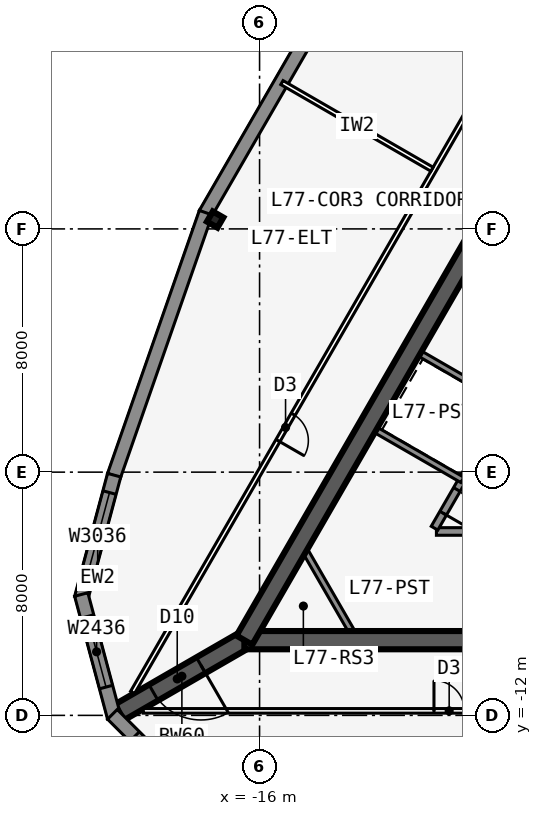
"""IFC4 building model, lengths in metres.
Left out: names, types, materials, properties, quantities, classifications, styles, units other than length and angle.
Written with IfcOpenShell. Run it as: python <this file> out.ifc"""

import sys

from ifc_helpers import new_model, si_unit, direction, frame, frame_2d, origin, origin_2d, place, context, subcontext, project, spatial, polyline, rectangle, i_section, outline, extrude, element, fill, save


model = new_model("IFC4")
c1 = context("Model", 3, precision=1e-05, world=origin(), true_north=direction((0.0, 1.0)))
c2 = subcontext(c1, "Body", "Model", "MODEL_VIEW")
j1 = project(units=[si_unit("LENGTHUNIT", "METRE"), si_unit("PLANEANGLEUNIT", "RADIAN")], contexts=[c1])
p1 = place(None, origin())
s1 = spatial("IfcSite", under=j1, at=p1, CompositionType="ELEMENT")
p2 = place(p1, origin())
s2 = spatial("IfcBuilding", under=s1, at=p2, CompositionType="ELEMENT")
p3 = place(p2, frame((0.0, 0.0, 297.8)))
s3 = spatial("IfcBuildingStorey", under=s2, at=p3, CompositionType="ELEMENT", Elevation=297.8)
p4 = place(p3, frame((-16.5, -9.526, 0.0), z_axis=(0.0, 0.0, 1.0), x_axis=(1.0, 0.0, 0.0)))
e1 = element("IfcWall", 1, at=p4, inside=s3, PredefinedType="SHEAR", context=c2, shape_type="SweptSolid", body=[
    extrude(rectangle(XDim=33.0, YDim=0.6, at=frame_2d((16.5, 0.0))), origin(), (0.0, 0.0, 1.0), 6.0),
])
p5 = place(p4, frame((14.05, 0.0, 0.0)))
e2 = element("IfcOpeningElement", 2, at=p5, cuts=e1, PredefinedType="OPENING", context=c2, shape_type="SweptSolid", body=[
    extrude(rectangle(XDim=1.8, YDim=2.13, at=frame_2d((0.9, 1.065))), frame((0.0, 0.31, 0.0), z_axis=(0.0, -1.0, 0.0), x_axis=(1.0, 0.0, 0.0)), (0.0, 0.0, 1.0), 0.62),
])
p6 = place(p3, frame((-10.183, -5.951, 0.0), z_axis=(0.0, 0.0, 1.0), x_axis=(1.0, 0.0, 0.0)))
e3 = element("IfcWall", 3, at=p6, inside=s3, PredefinedType="SOLIDWALL", context=c2, shape_type="SweptSolid", body=[
    extrude(rectangle(XDim=7.633, YDim=0.25, at=frame_2d((3.816, 0.0))), origin(), (0.0, 0.0, 1.0), 5.75),
])
p7 = place(p3, frame((0.0, 19.052, 0.0), z_axis=(0.0, 0.0, 1.0), x_axis=(-0.499999749417, -0.866025548458, 0.0)))
e4 = element("IfcWall", 4, at=p7, inside=s3, PredefinedType="SHEAR", context=c2, shape_type="SweptSolid", body=[
    extrude(rectangle(XDim=33.0, YDim=0.6, at=frame_2d((16.5, 0.0))), origin(), (0.0, 0.0, 1.0), 6.0),
])
p8 = place(p7, frame((14.15, 0.0, 0.0)))
e5 = element("IfcOpeningElement", 5, at=p8, cuts=e4, PredefinedType="OPENING", context=c2, shape_type="SweptSolid", body=[
    extrude(rectangle(XDim=1.8, YDim=2.13, at=frame_2d((0.9, 1.065))), frame((0.0, 0.31, 0.0), z_axis=(0.0, -1.0, 0.0), x_axis=(1.0, 0.0, 0.0)), (0.0, 0.0, 1.0), 0.62),
])
p9 = place(p7, frame((12.6, 0.0, 0.0)))
e6 = element("IfcOpeningElement", 6, at=p9, cuts=e4, PredefinedType="OPENING", context=c2, shape_type="SweptSolid", body=[
    extrude(rectangle(XDim=1.0, YDim=2.13, at=frame_2d((0.5, 1.065))), frame((0.0, 0.31, 0.0), z_axis=(0.0, -1.0, 0.0), x_axis=(1.0, 0.0, 0.0)), (0.0, 0.0, 1.0), 0.62),
])
p10 = place(p3, frame((-4.929, 3.365, 0.0), z_axis=(0.0, 0.0, 1.0), x_axis=(-0.499991433582, -0.866030349552, 0.0)))
e7 = element("IfcWall", 7, at=p10, inside=s3, PredefinedType="SOLIDWALL", context=c2, shape_type="SweptSolid", body=[
    extrude(rectangle(XDim=10.633, YDim=0.25, at=frame_2d((5.316, 0.0))), origin(), (0.0, 0.0, 1.0), 5.75),
])
p11 = place(p10, frame((9.164, 0.0, 0.0)))
e8 = element("IfcOpeningElement", 8, at=p11, cuts=e7, PredefinedType="OPENING", context=c2, shape_type="SweptSolid", body=[
    extrude(rectangle(XDim=0.9, YDim=2.13, at=frame_2d((0.45, 1.065))), frame((0.0, 0.135, 0.0), z_axis=(0.0, -1.0, 0.0), x_axis=(1.0, 0.0, 0.0)), (0.0, 0.0, 1.0), 0.27),
])
p12 = place(p10, frame((1.1, 0.0, 0.0)))
e9 = element("IfcOpeningElement", 9, at=p12, cuts=e7, PredefinedType="OPENING", context=c2, shape_type="SweptSolid", body=[
    extrude(rectangle(XDim=0.9, YDim=2.13, at=frame_2d((0.45, 1.065))), frame((0.0, 0.135, 0.0), z_axis=(0.0, -1.0, 0.0), x_axis=(1.0, 0.0, 0.0)), (0.0, 0.0, 1.0), 0.27),
])
p13 = place(p10, frame((4.0, 0.0, 0.0)))
e10 = element("IfcOpeningElement", 10, at=p13, cuts=e7, PredefinedType="OPENING", context=c2, shape_type="SweptSolid", body=[
    extrude(rectangle(XDim=0.9, YDim=2.13, at=frame_2d((0.45, 1.065))), frame((0.0, 0.135, 0.0), z_axis=(0.0, -1.0, 0.0), x_axis=(1.0, 0.0, 0.0)), (0.0, 0.0, 1.0), 0.27),
])
for number, where, z_axis, x_axis in (
    (11, (-7.879, -1.744, 0.0), (0.0, 0.0, 1.0), (-0.866, 0.5, 0.0)),
    (12, (-9.329, -4.256, 0.0), (0.0, 0.0, 1.0), (-0.866, 0.5, 0.0)),
):
    element("IfcWall", number, at=place(p3, frame(where, z_axis=z_axis, x_axis=x_axis)), inside=s3, PredefinedType="SOLIDWALL", context=c2, shape_type="SweptSolid", body=[
        extrude(rectangle(XDim=3.275, YDim=0.2, at=frame_2d((1.637, 0.0))), origin(), (0.0, 0.0, 1.0), 5.75),
    ])
p14 = place(p3, frame((-16.5, -9.526, 0.0), z_axis=(0.0, 0.0, 1.0), x_axis=(-0.866031398331, -0.499989616998, 0.0)))
e13 = element("IfcWall", 13, at=p14, inside=s3, PredefinedType="SHEAR", context=c2, shape_type="SweptSolid", body=[
    extrude(rectangle(XDim=4.746, YDim=0.6, at=frame_2d((2.373, 0.0))), origin(), (0.0, 0.0, 1.0), 6.0),
])
p15 = place(p14, frame((1.65, 0.0, 0.0)))
e14 = element("IfcOpeningElement", 14, at=p15, cuts=e13, PredefinedType="OPENING", context=c2, shape_type="SweptSolid", body=[
    extrude(rectangle(XDim=1.8, YDim=2.13, at=frame_2d((0.9, 1.065))), frame((0.0, 0.31, 0.0), z_axis=(0.0, -1.0, 0.0), x_axis=(1.0, 0.0, 0.0)), (0.0, 0.0, 1.0), 0.62),
])
p16 = place(p3, frame((-17.461, 4.308, 0.0), z_axis=(0.0, 0.0, 1.0), x_axis=(-0.866025403784, 0.5, 0.0)))
e15 = element("IfcColumn", 15, at=p16, inside=s3, PredefinedType="COLUMN", context=c2, shape_type="SweptSolid", body=[
    extrude(i_section(OverallWidth=0.399, OverallDepth=0.386, WebThickness=0.021, FlangeThickness=0.033, at=origin_2d()), origin(), (0.0, 0.0, 1.0), 6.0),
])
p17 = place(p3, frame((-12.786, 13.156, 0.0), z_axis=(0.0, 0.0, 1.0), x_axis=(-0.500004234368, -0.866022959057, 0.0)))
e16 = element("IfcWall", 16, at=p17, inside=s3, PredefinedType="SOLIDWALL", context=c2, shape_type="SweptSolid", body=[
    extrude(outline(polyline([(0.0, 0.0), (10.0, 0.0), (10.0, 5.75), (0.0, 5.75), (0.0, 0.0)]), holes=[polyline([(7.25, 2.875), (7.173, 3.457), (6.948, 4.0), (6.591, 4.466), (6.125, 4.823), (5.582, 5.048), (5.0, 5.125), (4.417, 5.048), (3.875, 4.823), (3.409, 4.466), (3.052, 4.0), (2.827, 3.457), (2.75, 2.875), (2.827, 2.293), (3.052, 1.75), (3.409, 1.284), (3.875, 0.926), (4.417, 0.702), (5.0, 0.625), (5.582, 0.702), (6.125, 0.926), (6.591, 1.284), (6.948, 1.75), (7.173, 2.293), (7.25, 2.875)])]), frame((0.0, 0.225, 0.0), z_axis=(0.0, -1.0, 0.0), x_axis=(1.0, 0.0, 0.0)), (0.0, 0.0, 1.0), 0.45),
])
p18 = place(p3, frame((-17.769, 4.534, 0.0), z_axis=(0.0, 0.0, 1.0), x_axis=(-0.329547852357, -0.944138873793, 0.0)))
e17 = element("IfcWall", 17, at=p18, inside=s3, PredefinedType="SOLIDWALL", context=c2, shape_type="SweptSolid", body=[
    extrude(outline(polyline([(0.0, 0.0), (9.161, 0.0), (9.161, 5.75), (0.0, 5.75), (0.0, 0.0)]), holes=[polyline([(6.831, 2.875), (6.754, 3.457), (6.529, 4.0), (6.171, 4.466), (5.706, 4.823), (5.163, 5.048), (4.581, 5.125), (3.998, 5.048), (3.456, 4.823), (2.99, 4.466), (2.632, 4.0), (2.407, 3.457), (2.331, 2.875), (2.407, 2.293), (2.632, 1.75), (2.99, 1.284), (3.456, 0.926), (3.998, 0.702), (4.581, 0.625), (5.163, 0.702), (5.706, 0.926), (6.171, 1.284), (6.529, 1.75), (6.754, 2.293), (6.831, 2.875)])]), frame((0.0, 0.225, 0.0), z_axis=(0.0, -1.0, 0.0), x_axis=(1.0, 0.0, 0.0)), (0.0, 0.0, 1.0), 0.45),
])
p19 = place(p3, frame((-20.783, -4.1, 0.0), z_axis=(0.0, 0.0, 1.0), x_axis=(-0.258784695888, -0.965935029479, 0.0)))
e18 = element("IfcWall", 18, at=p19, inside=s3, PredefinedType="SOLIDWALL", context=c2, shape_type="SweptSolid", body=[
    extrude(rectangle(XDim=4.184, YDim=0.45, at=frame_2d((2.092, 0.0))), origin(), (0.0, 0.0, 1.0), 5.75),
])
p20 = place(p19, frame((0.592, 0.0, 0.9)))
e19 = element("IfcOpeningElement", 19, at=p20, cuts=e18, PredefinedType="OPENING", context=c2, shape_type="SweptSolid", body=[
    extrude(rectangle(XDim=3.0, YDim=3.6, at=frame_2d((1.5, 1.8))), frame((0.0, 0.235, 0.0), z_axis=(0.0, -1.0, 0.0), x_axis=(1.0, 0.0, 0.0)), (0.0, 0.0, 1.0), 0.47),
])
p21 = place(p3, frame((-21.865, -8.025, 0.0), z_axis=(0.0, 0.0, 1.0), x_axis=(0.258784695888, -0.965935029479, 0.0)))
e20 = element("IfcWall", 20, at=p21, inside=s3, PredefinedType="SOLIDWALL", context=c2, shape_type="SweptSolid", body=[
    extrude(outline(polyline([(4.184, 0.225), (4.125, 0.225), (3.778, 0.132), (3.753, 0.225), (0.0, 0.225), (0.0, -0.225), (4.184, -0.225), (4.184, 0.225)])), origin(), (0.0, 0.0, 1.0), 5.75),
])
p22 = place(p21, frame((0.751, 0.0, 0.9)))
e21 = element("IfcOpeningElement", 21, at=p22, cuts=e20, PredefinedType="OPENING", context=c2, shape_type="SweptSolid", body=[
    extrude(rectangle(XDim=2.4, YDim=3.6, at=frame_2d((1.2, 1.8))), frame((0.0, 0.235, 0.0), z_axis=(0.0, -1.0, 0.0), x_axis=(1.0, 0.0, 0.0)), (0.0, 0.0, 1.0), 0.47),
])
p23 = place(p3, frame((-20.841, -11.965, 0.0), z_axis=(0.0, 0.0, 1.0), x_axis=(0.707106781187, -0.707106781187, 0.0)))
e22 = element("IfcWall", 22, at=p23, inside=s3, PredefinedType="SOLIDWALL", context=c2, shape_type="SweptSolid", body=[
    extrude(outline(polyline([(4.184, 0.225), (0.431, 0.225), (0.406, 0.132), (0.059, 0.225), (0.0, 0.225), (0.0, -0.225), (4.184, -0.225), (4.184, 0.225)])), origin(), (0.0, 0.0, 1.0), 5.75),
])
p24 = place(p23, frame((1.032, 0.0, 0.9)))
e23 = element("IfcOpeningElement", 23, at=p24, cuts=e22, PredefinedType="OPENING", context=c2, shape_type="SweptSolid", body=[
    extrude(rectangle(XDim=2.4, YDim=3.6, at=frame_2d((1.2, 1.8))), frame((0.0, 0.235, 0.0), z_axis=(0.0, -1.0, 0.0), x_axis=(1.0, 0.0, 0.0)), (0.0, 0.0, 1.0), 0.47),
])
p25 = place(p3, frame((-19.827, -11.851, 0.0), z_axis=(0.0, 0.0, 1.0), x_axis=(1.0, 0.0, 0.0)))
e24 = element("IfcWall", 24, at=p25, inside=s3, PredefinedType="PARTITIONING", context=c2, shape_type="SweptSolid", body=[
    extrude(rectangle(XDim=39.654, YDim=0.15, at=frame_2d((19.827, 0.0))), origin(), (0.0, 0.0, 1.0), 5.75),
])
p26 = place(p25, frame((9.563, 0.0, 0.0)))
e25 = element("IfcOpeningElement", 25, at=p26, cuts=e24, PredefinedType="OPENING", context=c2, shape_type="SweptSolid", body=[
    extrude(rectangle(XDim=1.0, YDim=2.13, at=frame_2d((0.5, 1.065))), frame((0.0, 0.085, 0.0), z_axis=(0.0, -1.0, 0.0), x_axis=(1.0, 0.0, 0.0)), (0.0, 0.0, 1.0), 0.17),
])
p27 = place(p25, frame((29.091, 0.0, 0.0)))
e26 = element("IfcOpeningElement", 26, at=p27, cuts=e24, PredefinedType="OPENING", context=c2, shape_type="SweptSolid", body=[
    extrude(rectangle(XDim=1.0, YDim=2.13, at=frame_2d((0.5, 1.065))), frame((0.0, 0.085, 0.0), z_axis=(0.0, -1.0, 0.0), x_axis=(1.0, 0.0, 0.0)), (0.0, 0.0, 1.0), 0.17),
])
p28 = place(p3, frame((-0.35, 23.096, 0.0), z_axis=(0.0, 0.0, 1.0), x_axis=(-0.499998875317, -0.866026053119, 0.0)))
e27 = element("IfcWall", 27, at=p28, inside=s3, PredefinedType="PARTITIONING", context=c2, shape_type="SweptSolid", body=[
    extrude(rectangle(XDim=39.654, YDim=0.15, at=frame_2d((19.827, 0.0))), origin(), (0.0, 0.0, 1.0), 5.75),
])
p29 = place(p28, frame((9.563, 0.0, 0.0)))
e28 = element("IfcOpeningElement", 28, at=p29, cuts=e27, PredefinedType="OPENING", context=c2, shape_type="SweptSolid", body=[
    extrude(rectangle(XDim=1.0, YDim=2.13, at=frame_2d((0.5, 1.065))), frame((0.0, 0.085, 0.0), z_axis=(0.0, -1.0, 0.0), x_axis=(1.0, 0.0, 0.0)), (0.0, 0.0, 1.0), 0.17),
])
p30 = place(p28, frame((29.091, 0.0, 0.0)))
e29 = element("IfcOpeningElement", 29, at=p30, cuts=e27, PredefinedType="OPENING", context=c2, shape_type="SweptSolid", body=[
    extrude(rectangle(XDim=1.0, YDim=2.13, at=frame_2d((0.5, 1.065))), frame((0.0, 0.085, 0.0), z_axis=(0.0, -1.0, 0.0), x_axis=(1.0, 0.0, 0.0)), (0.0, 0.0, 1.0), 0.17),
])
p31 = place(p3, frame((-10.329, 5.963, 0.0), z_axis=(0.0, 0.0, 1.0), x_axis=(-0.86601224135, 0.500022797313, 0.0)))
e30 = element("IfcWall", 30, at=p31, inside=s3, PredefinedType="PARTITIONING", context=c2, shape_type="SweptSolid", body=[
    extrude(rectangle(XDim=5.699, YDim=0.15, at=frame_2d((2.85, 0.0))), origin(), (0.0, 0.0, 1.0), 4.708),
])
p32 = place(p3, frame((-12.978, -9.226, 0.0), z_axis=(0.0, 0.0, 1.0), x_axis=(-0.499952404951, 0.866052881055, 0.0)))
e31 = element("IfcWall", 31, at=p32, inside=s3, PredefinedType="SOLIDWALL", context=c2, shape_type="SweptSolid", body=[
    extrude(rectangle(XDim=3.002, YDim=0.2, at=frame_2d((1.501, 0.0))), origin(), (0.0, 0.0, 1.0), 5.75),
])
p33 = place(p20, origin())
e32 = element("IfcWindow", 32, at=p33, inside=s3, PartitioningType="SINGLE_PANEL", PredefinedType="WINDOW", context=c2, shape_type="SweptSolid", body=[
    extrude(rectangle(XDim=3.0, YDim=3.6, at=frame_2d((1.5, 1.8))), frame((0.0, 0.03, 0.0), z_axis=(0.0, -1.0, 0.0), x_axis=(1.0, 0.0, 0.0)), (0.0, 0.0, 1.0), 0.06),
])
fill(e19, e32)
p34 = place(p22, origin())
e33 = element("IfcWindow", 33, at=p34, inside=s3, PartitioningType="SINGLE_PANEL", PredefinedType="WINDOW", context=c2, shape_type="SweptSolid", body=[
    extrude(rectangle(XDim=2.4, YDim=3.6, at=frame_2d((1.2, 1.8))), frame((0.0, 0.03, 0.0), z_axis=(0.0, -1.0, 0.0), x_axis=(1.0, 0.0, 0.0)), (0.0, 0.0, 1.0), 0.06),
])
fill(e21, e33)
p35 = place(p24, origin())
e34 = element("IfcWindow", 34, at=p35, inside=s3, PartitioningType="SINGLE_PANEL", PredefinedType="WINDOW", context=c2, shape_type="SweptSolid", body=[
    extrude(rectangle(XDim=2.4, YDim=3.6, at=frame_2d((1.2, 1.8))), frame((0.0, 0.03, 0.0), z_axis=(0.0, -1.0, 0.0), x_axis=(1.0, 0.0, 0.0)), (0.0, 0.0, 1.0), 0.06),
])
fill(e23, e34)
p36 = place(p26, origin())
e35 = element("IfcDoor", 35, at=p36, inside=s3, OperationType="SINGLE_SWING_LEFT", PredefinedType="DOOR", context=c2, shape_type="SweptSolid", body=[
    extrude(rectangle(XDim=1.0, YDim=2.13, at=frame_2d((0.5, 1.065))), frame((0.0, 0.025, 0.0), z_axis=(0.0, -1.0, 0.0), x_axis=(1.0, 0.0, 0.0)), (0.0, 0.0, 1.0), 0.05),
])
fill(e25, e35)
p37 = place(p30, origin())
e36 = element("IfcDoor", 36, at=p37, inside=s3, OperationType="SINGLE_SWING_RIGHT", PredefinedType="DOOR", context=c2, shape_type="SweptSolid", body=[
    extrude(rectangle(XDim=1.0, YDim=2.13, at=frame_2d((0.5, 1.065))), frame((0.0, 0.025, 0.0), z_axis=(0.0, -1.0, 0.0), x_axis=(1.0, 0.0, 0.0)), (0.0, 0.0, 1.0), 0.05),
])
fill(e29, e36)
p38 = place(p15, origin())
e37 = element("IfcDoor", 37, at=p38, inside=s3, OperationType="DOUBLE_DOOR_DOUBLE_SWING", PredefinedType="DOOR", context=c2, shape_type="SweptSolid", body=[
    extrude(rectangle(XDim=1.8, YDim=2.13, at=frame_2d((0.9, 1.065))), frame((0.0, 0.025, 0.0), z_axis=(0.0, -1.0, 0.0), x_axis=(1.0, 0.0, 0.0)), (0.0, 0.0, 1.0), 0.05),
])
fill(e14, e37)
p39 = place(p11, origin())
e38 = element("IfcDoor", 38, at=p39, inside=s3, OperationType="SINGLE_SWING_RIGHT", PredefinedType="DOOR", context=c2, shape_type="SweptSolid", body=[
    extrude(rectangle(XDim=0.9, YDim=2.13, at=frame_2d((0.45, 1.065))), frame((0.0, 0.025, 0.0), z_axis=(0.0, -1.0, 0.0), x_axis=(1.0, 0.0, 0.0)), (0.0, 0.0, 1.0), 0.05),
])
fill(e8, e38)
save(model, sys.argv[1])
